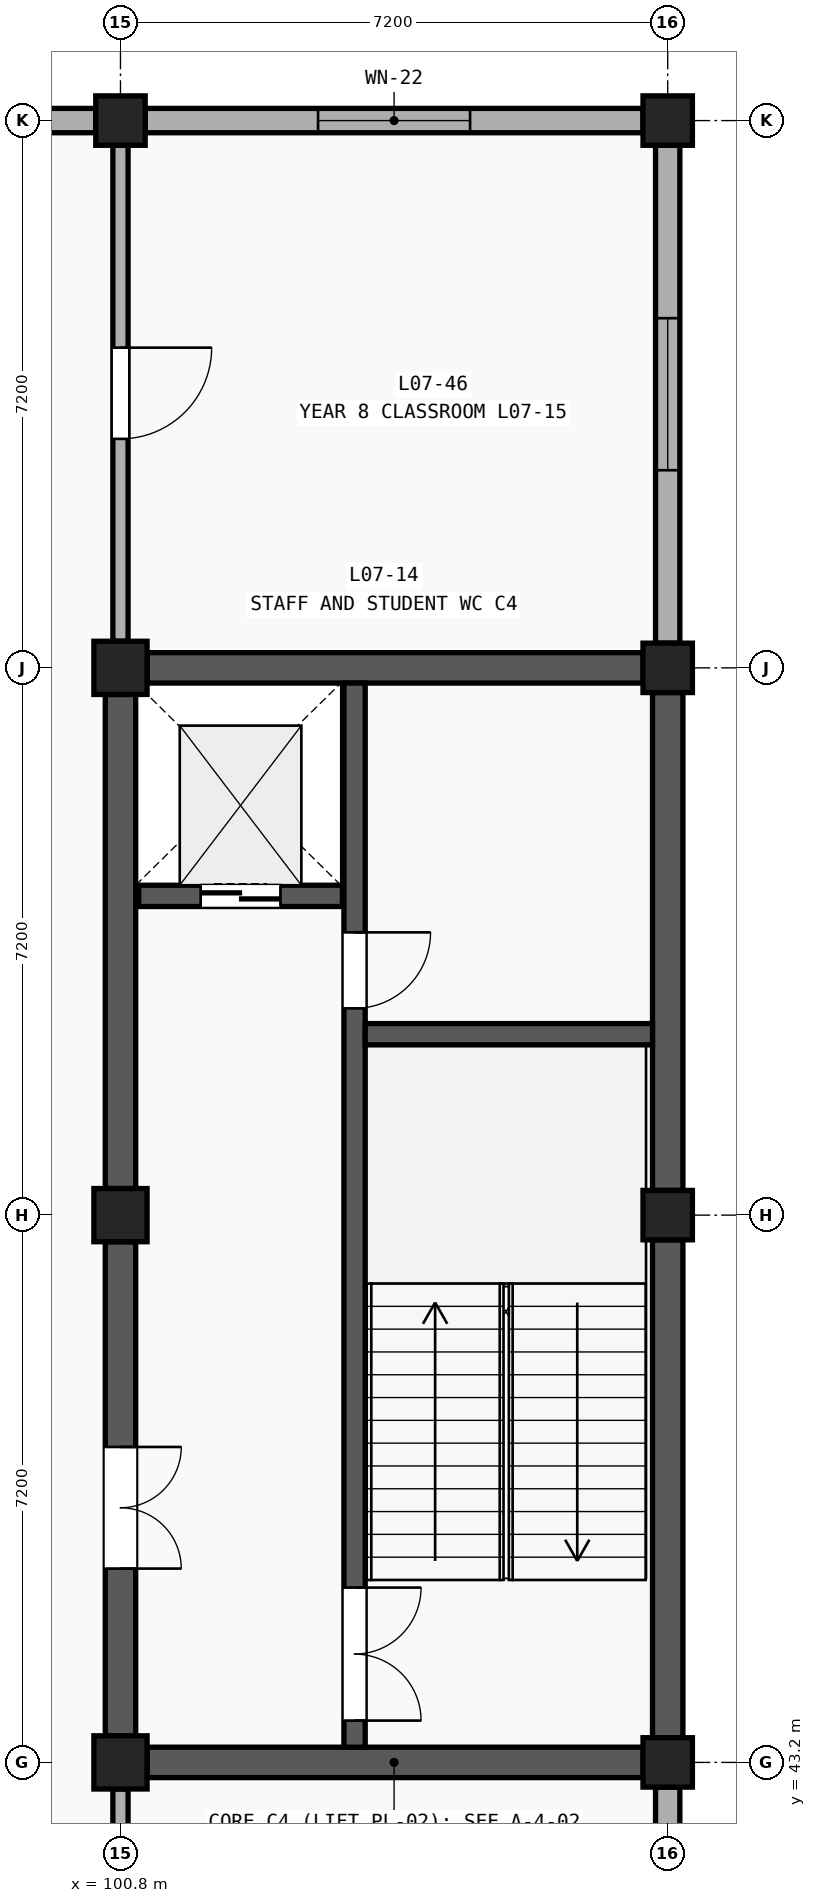
"""IFC4 building model, lengths in metres.
Left out: names, types, materials, properties, quantities, classifications, styles, units other than length and angle.
Written with IfcOpenShell. Run it as: python <this file> out.ifc"""

import sys

from ifc_helpers import new_model, si_unit, direction, frame, frame_2d, origin, origin_2d, place, context, subcontext, project, spatial, rectangle, extrude, element, fill, save


model = new_model("IFC4")
c1 = context("Model", 3, precision=1e-05, world=origin(), true_north=direction((0.0, 1.0)))
c2 = subcontext(c1, "Body", "Model", "MODEL_VIEW")
j1 = project(units=[si_unit("LENGTHUNIT", "METRE"), si_unit("PLANEANGLEUNIT", "RADIAN")], contexts=[c1])
p1 = place(None, origin())
s1 = spatial("IfcSite", under=j1, at=p1, CompositionType="ELEMENT")
p2 = place(p1, origin())
s2 = spatial("IfcBuilding", under=s1, at=p2, CompositionType="ELEMENT")
p3 = place(p2, frame((0.0, 0.0, 30.6)))
s3 = spatial("IfcBuildingStorey", under=s2, at=p3, CompositionType="ELEMENT", Elevation=30.6)
for number, where, z_axis, x_axis in (
    (1, (100.8, 43.2, 0.0), (0.0, 0.0, 1.0), (1.0, 0.0, 0.0)),
    (2, (100.8, 50.4, 0.0), (0.0, 0.0, 1.0), (1.0, 0.0, 0.0)),
    (3, (100.8, 57.6, 0.0), (0.0, 0.0, 1.0), (1.0, 0.0, 0.0)),
):
    element("IfcColumn", number, at=place(p3, frame(where, z_axis=z_axis, x_axis=x_axis)), inside=s3, PredefinedType="COLUMN", context=c2, shape_type="SweptSolid", body=[
        extrude(rectangle(XDim=0.7, YDim=0.7, at=origin_2d()), origin(), (0.0, 0.0, 1.0), 4.2),
    ])
for number, where, z_axis, x_axis in (
    (4, (100.8, 64.8, 0.0), (0.0, 0.0, 1.0), (1.0, 0.0, 0.0)),
    (5, (108.0, 43.2, 0.0), (0.0, 0.0, 1.0), (1.0, 0.0, 0.0)),
    (6, (108.0, 50.4, 0.0), (0.0, 0.0, 1.0), (1.0, 0.0, 0.0)),
    (7, (108.0, 57.6, 0.0), (0.0, 0.0, 1.0), (1.0, 0.0, 0.0)),
    (8, (108.0, 64.8, 0.0), (0.0, 0.0, 1.0), (1.0, 0.0, 0.0)),
):
    element("IfcColumn", number, at=place(p3, frame(where, z_axis=z_axis, x_axis=x_axis)), inside=s3, PredefinedType="COLUMN", context=c2, shape_type="SweptSolid", body=[
        extrude(rectangle(XDim=0.65, YDim=0.65, at=origin_2d()), origin(), (0.0, 0.0, 1.0), 4.2),
    ])
p4 = place(p3, frame((93.925, 64.8, 0.0), z_axis=(0.0, 0.0, 1.0), x_axis=(1.0, 0.0, 0.0)))
e9 = element("IfcWall", 9, at=p4, inside=s3, PredefinedType="SOLIDWALL", context=c2, shape_type="SweptSolid", body=[
    extrude(rectangle(XDim=6.55, YDim=0.32, at=frame_2d((3.275, 0.0))), origin(), (0.0, 0.0, 1.0), 3.25),
])
p5 = place(p4, frame((2.4, 0.0, 1.2)))
e10 = element("IfcOpeningElement", 10, at=p5, cuts=e9, PredefinedType="OPENING", context=c2, shape_type="SweptSolid", body=[
    extrude(rectangle(XDim=1.75, YDim=1.35, at=frame_2d((0.875, 0.675))), frame((0.0, 0.172, 0.0), z_axis=(0.0, -1.0, 0.0), x_axis=(1.0, 0.0, 0.0)), (0.0, 0.0, 1.0), 0.344),
])
p6 = place(p3, frame((108.0, 36.375, 0.0), z_axis=(0.0, 0.0, 1.0), x_axis=(0.0, 1.0, 0.0)))
e11 = element("IfcWall", 11, at=p6, inside=s3, PredefinedType="SOLIDWALL", context=c2, shape_type="SweptSolid", body=[
    extrude(rectangle(XDim=6.5, YDim=0.32, at=frame_2d((3.25, 0.0))), origin(), (0.0, 0.0, 1.0), 3.25),
])
p7 = place(p6, frame((2.0, 0.0, 1.1)))
e12 = element("IfcOpeningElement", 12, at=p7, cuts=e11, PredefinedType="OPENING", context=c2, shape_type="SweptSolid", body=[
    extrude(rectangle(XDim=2.5, YDim=1.5, at=frame_2d((1.25, 0.75))), frame((0.0, 0.172, 0.0), z_axis=(0.0, -1.0, 0.0), x_axis=(1.0, 0.0, 0.0)), (0.0, 0.0, 1.0), 0.344),
])
p8 = place(p3, frame((101.125, 64.8, 0.0), z_axis=(0.0, 0.0, 1.0), x_axis=(1.0, 0.0, 0.0)))
e13 = element("IfcWall", 13, at=p8, inside=s3, PredefinedType="SOLIDWALL", context=c2, shape_type="SweptSolid", body=[
    extrude(rectangle(XDim=6.55, YDim=0.32, at=frame_2d((3.275, 0.0))), origin(), (0.0, 0.0, 1.0), 3.25),
])
p9 = place(p8, frame((2.275, 0.0, 0.7)))
e14 = element("IfcOpeningElement", 14, at=p9, cuts=e13, PredefinedType="OPENING", context=c2, shape_type="SweptSolid", body=[
    extrude(rectangle(XDim=2.0, YDim=2.2, at=frame_2d((1.0, 1.1))), frame((0.0, 0.172, 0.0), z_axis=(0.0, -1.0, 0.0), x_axis=(1.0, 0.0, 0.0)), (0.0, 0.0, 1.0), 0.344),
])
p10 = place(p3, frame((108.0, 57.925, 0.0), z_axis=(0.0, 0.0, 1.0), x_axis=(0.0, 1.0, 0.0)))
e15 = element("IfcWall", 15, at=p10, inside=s3, PredefinedType="SOLIDWALL", context=c2, shape_type="SweptSolid", body=[
    extrude(rectangle(XDim=6.55, YDim=0.32, at=frame_2d((3.275, 0.0))), origin(), (0.0, 0.0, 1.0), 3.25),
])
p11 = place(p10, frame((2.275, 0.0, 0.7)))
e16 = element("IfcOpeningElement", 16, at=p11, cuts=e15, PredefinedType="OPENING", context=c2, shape_type="SweptSolid", body=[
    extrude(rectangle(XDim=2.0, YDim=2.2, at=frame_2d((1.0, 1.1))), frame((0.0, 0.172, 0.0), z_axis=(0.0, -1.0, 0.0), x_axis=(1.0, 0.0, 0.0)), (0.0, 0.0, 1.0), 0.344),
])
p12 = place(p3, frame((100.8, 43.55, 0.0), z_axis=(0.0, 0.0, 1.0), x_axis=(0.0, 1.0, 0.0)))
e17 = element("IfcWall", 17, at=p12, inside=s3, PredefinedType="SHEAR", context=c2, shape_type="SweptSolid", body=[
    extrude(rectangle(XDim=6.5, YDim=0.4, at=frame_2d((3.25, 0.0))), origin(), (0.0, 0.0, 1.0), 3.11),
])
p13 = place(p12, frame((2.2, 0.0, 0.0)))
e18 = element("IfcOpeningElement", 18, at=p13, cuts=e17, PredefinedType="OPENING", context=c2, shape_type="SweptSolid", body=[
    extrude(rectangle(XDim=1.6, YDim=2.2, at=frame_2d((0.8, 1.1))), frame((0.0, 0.212, 0.0), z_axis=(0.0, -1.0, 0.0), x_axis=(1.0, 0.0, 0.0)), (0.0, 0.0, 1.0), 0.424),
])
p14 = place(p3, frame((100.8, 50.75, 0.0), z_axis=(0.0, 0.0, 1.0), x_axis=(0.0, 1.0, 0.0)))
e19 = element("IfcWall", 19, at=p14, inside=s3, PredefinedType="SHEAR", context=c2, shape_type="SweptSolid", body=[
    extrude(rectangle(XDim=6.5, YDim=0.4, at=frame_2d((3.25, 0.0))), origin(), (0.0, 0.0, 1.0), 3.11),
])
p15 = place(p3, frame((108.0, 43.525, 0.0), z_axis=(0.0, 0.0, 1.0), x_axis=(0.0, 1.0, 0.0)))
e20 = element("IfcWall", 20, at=p15, inside=s3, PredefinedType="SHEAR", context=c2, shape_type="SweptSolid", body=[
    extrude(rectangle(XDim=6.55, YDim=0.4, at=frame_2d((3.275, 0.0))), origin(), (0.0, 0.0, 1.0), 3.25),
])
p16 = place(p3, frame((108.0, 50.725, 0.0), z_axis=(0.0, 0.0, 1.0), x_axis=(0.0, 1.0, 0.0)))
e21 = element("IfcWall", 21, at=p16, inside=s3, PredefinedType="SHEAR", context=c2, shape_type="SweptSolid", body=[
    extrude(rectangle(XDim=6.55, YDim=0.4, at=frame_2d((3.275, 0.0))), origin(), (0.0, 0.0, 1.0), 3.25),
])
p17 = place(p3, frame((101.15, 43.2, 0.0), z_axis=(0.0, 0.0, 1.0), x_axis=(1.0, 0.0, 0.0)))
e22 = element("IfcWall", 22, at=p17, inside=s3, PredefinedType="SHEAR", context=c2, shape_type="SweptSolid", body=[
    extrude(rectangle(XDim=6.525, YDim=0.4, at=frame_2d((3.263, 0.0))), origin(), (0.0, 0.0, 1.0), 3.18),
])
p18 = place(p3, frame((101.15, 57.6, 0.0), z_axis=(0.0, 0.0, 1.0), x_axis=(1.0, 0.0, 0.0)))
e23 = element("IfcWall", 23, at=p18, inside=s3, PredefinedType="SHEAR", context=c2, shape_type="SweptSolid", body=[
    extrude(rectangle(XDim=6.525, YDim=0.4, at=frame_2d((3.263, 0.0))), origin(), (0.0, 0.0, 1.0), 3.11),
])
p19 = place(p3, frame((103.88, 43.4, 0.0), z_axis=(0.0, 0.0, 1.0), x_axis=(0.0, 1.0, 0.0)))
e24 = element("IfcWall", 24, at=p19, inside=s3, PredefinedType="SHEAR", context=c2, shape_type="SweptSolid", body=[
    extrude(rectangle(XDim=14.0, YDim=0.28, at=frame_2d((7.0, 0.0))), origin(), (0.0, 0.0, 1.0), 3.88),
])
p20 = place(p19, frame((0.35, 0.0, 0.0)))
e25 = element("IfcOpeningElement", 25, at=p20, cuts=e24, PredefinedType="OPENING", context=c2, shape_type="SweptSolid", body=[
    extrude(rectangle(XDim=1.75, YDim=2.15, at=frame_2d((0.875, 1.075))), frame((0.0, 0.152, 0.0), z_axis=(0.0, -1.0, 0.0), x_axis=(1.0, 0.0, 0.0)), (0.0, 0.0, 1.0), 0.304),
])
p21 = place(p19, frame((9.72, 0.0, 0.0)))
e26 = element("IfcOpeningElement", 26, at=p21, cuts=e24, PredefinedType="OPENING", context=c2, shape_type="SweptSolid", body=[
    extrude(rectangle(XDim=1.0, YDim=2.15, at=frame_2d((0.5, 1.075))), frame((0.0, 0.152, 0.0), z_axis=(0.0, -1.0, 0.0), x_axis=(1.0, 0.0, 0.0)), (0.0, 0.0, 1.0), 0.304),
])
p22 = place(p3, frame((104.02, 52.78, 0.0), z_axis=(0.0, 0.0, 1.0), x_axis=(1.0, 0.0, 0.0)))
e27 = element("IfcWall", 27, at=p22, inside=s3, PredefinedType="SHEAR", context=c2, shape_type="SweptSolid", body=[
    extrude(rectangle(XDim=3.78, YDim=0.28, at=frame_2d((1.89, 0.0))), origin(), (0.0, 0.0, 1.0), 3.88),
])
p23 = place(p3, frame((101.04, 54.6, 0.0), z_axis=(0.0, 0.0, 1.0), x_axis=(1.0, 0.0, 0.0)))
e28 = element("IfcWall", 28, at=p23, inside=s3, PredefinedType="SHEAR", context=c2, shape_type="SweptSolid", body=[
    extrude(rectangle(XDim=2.68, YDim=0.28, at=frame_2d((1.34, 0.0))), origin(), (0.0, 0.0, 1.0), 3.88),
])
p24 = place(p23, frame((0.815, 0.0, 0.0)))
e29 = element("IfcOpeningElement", 29, at=p24, cuts=e28, PredefinedType="OPENING", context=c2, shape_type="SweptSolid", body=[
    extrude(rectangle(XDim=1.05, YDim=2.2, at=frame_2d((0.525, 1.1))), frame((0.0, 0.152, 0.0), z_axis=(0.0, -1.0, 0.0), x_axis=(1.0, 0.0, 0.0)), (0.0, 0.0, 1.0), 0.304),
])
p25 = place(p3, frame((100.8, 36.35, 0.0), z_axis=(0.0, 0.0, 1.0), x_axis=(0.0, 1.0, 0.0)))
e30 = element("IfcWall", 30, at=p25, inside=s3, PredefinedType="PARTITIONING", context=c2, shape_type="SweptSolid", body=[
    extrude(rectangle(XDim=6.5, YDim=0.2, at=frame_2d((3.25, 0.0))), origin(), (0.0, 0.0, 1.0), 3.11),
])
p26 = place(p25, frame((2.67, 0.0, 0.0)))
e31 = element("IfcOpeningElement", 31, at=p26, cuts=e30, PredefinedType="OPENING", context=c2, shape_type="SweptSolid", body=[
    extrude(rectangle(XDim=1.16, YDim=2.22, at=frame_2d((0.58, 1.11))), frame((0.0, 0.112, 0.0), z_axis=(0.0, -1.0, 0.0), x_axis=(1.0, 0.0, 0.0)), (0.0, 0.0, 1.0), 0.224),
])
p27 = place(p3, frame((100.8, 57.95, 0.0), z_axis=(0.0, 0.0, 1.0), x_axis=(0.0, 1.0, 0.0)))
e32 = element("IfcWall", 32, at=p27, inside=s3, PredefinedType="PARTITIONING", context=c2, shape_type="SweptSolid", body=[
    extrude(rectangle(XDim=6.525, YDim=0.2, at=frame_2d((3.263, 0.0))), origin(), (0.0, 0.0, 1.0), 3.11),
])
p28 = place(p27, frame((2.663, 0.0, 0.0)))
e33 = element("IfcOpeningElement", 33, at=p28, cuts=e32, PredefinedType="OPENING", context=c2, shape_type="SweptSolid", body=[
    extrude(rectangle(XDim=1.2, YDim=2.24, at=frame_2d((0.6, 1.12))), frame((0.0, 0.112, 0.0), z_axis=(0.0, -1.0, 0.0), x_axis=(1.0, 0.0, 0.0)), (0.0, 0.0, 1.0), 0.224),
])
p29 = place(p9, origin())
e34 = element("IfcWindow", 34, at=p29, inside=s3, PartitioningType="SINGLE_PANEL", PredefinedType="WINDOW", context=c2, shape_type="SweptSolid", body=[
    extrude(rectangle(XDim=2.0, YDim=2.2, at=frame_2d((1.0, 1.1))), frame((0.0, 0.03, 0.0), z_axis=(0.0, -1.0, 0.0), x_axis=(1.0, 0.0, 0.0)), (0.0, 0.0, 1.0), 0.06),
])
fill(e14, e34)
p30 = place(p11, origin())
e35 = element("IfcWindow", 35, at=p30, inside=s3, PartitioningType="SINGLE_PANEL", PredefinedType="WINDOW", context=c2, shape_type="SweptSolid", body=[
    extrude(rectangle(XDim=2.0, YDim=2.2, at=frame_2d((1.0, 1.1))), frame((0.0, 0.03, 0.0), z_axis=(0.0, -1.0, 0.0), x_axis=(1.0, 0.0, 0.0)), (0.0, 0.0, 1.0), 0.06),
])
fill(e16, e35)
p31 = place(p13, frame((1.6, 0.0, 0.0), z_axis=(0.0, 0.0, 1.0), x_axis=(-1.0, 0.0, 0.0)))
e36 = element("IfcDoor", 36, at=p31, inside=s3, OperationType="DOUBLE_DOOR_SINGLE_SWING", PredefinedType="DOOR", context=c2, shape_type="SweptSolid", body=[
    extrude(rectangle(XDim=1.6, YDim=2.2, at=frame_2d((0.8, 1.1))), frame((0.0, 0.025, 0.0), z_axis=(0.0, -1.0, 0.0), x_axis=(1.0, 0.0, 0.0)), (0.0, 0.0, 1.0), 0.05),
])
fill(e18, e36)
p32 = place(p20, frame((1.75, 0.0, 0.0), z_axis=(0.0, 0.0, 1.0), x_axis=(-1.0, 0.0, 0.0)))
e37 = element("IfcDoor", 37, at=p32, inside=s3, OperationType="DOUBLE_DOOR_SINGLE_SWING", PredefinedType="DOOR", context=c2, shape_type="SweptSolid", body=[
    extrude(rectangle(XDim=1.75, YDim=2.15, at=frame_2d((0.875, 1.075))), frame((0.0, 0.025, 0.0), z_axis=(0.0, -1.0, 0.0), x_axis=(1.0, 0.0, 0.0)), (0.0, 0.0, 1.0), 0.05),
])
fill(e25, e37)
p33 = place(p21, frame((1.0, 0.0, 0.0), z_axis=(0.0, 0.0, 1.0), x_axis=(-1.0, 0.0, 0.0)))
e38 = element("IfcDoor", 38, at=p33, inside=s3, OperationType="SINGLE_SWING_LEFT", PredefinedType="DOOR", context=c2, shape_type="SweptSolid", body=[
    extrude(rectangle(XDim=1.0, YDim=2.15, at=frame_2d((0.5, 1.075))), frame((0.0, 0.025, 0.0), z_axis=(0.0, -1.0, 0.0), x_axis=(1.0, 0.0, 0.0)), (0.0, 0.0, 1.0), 0.05),
])
fill(e26, e38)
p34 = place(p24, frame((1.05, 0.0, 0.0), z_axis=(0.0, 0.0, 1.0), x_axis=(-1.0, 0.0, 0.0)))
e39 = element("IfcDoor", 39, at=p34, inside=s3, OperationType="DOUBLE_DOOR_SLIDING", PredefinedType="DOOR", context=c2, shape_type="SweptSolid", body=[
    extrude(rectangle(XDim=1.05, YDim=2.2, at=frame_2d((0.525, 1.1))), frame((0.0, 0.025, 0.0), z_axis=(0.0, -1.0, 0.0), x_axis=(1.0, 0.0, 0.0)), (0.0, 0.0, 1.0), 0.05),
])
fill(e29, e39)
p35 = place(p28, frame((1.2, 0.0, 0.0), z_axis=(0.0, 0.0, 1.0), x_axis=(-1.0, 0.0, 0.0)))
e40 = element("IfcDoor", 40, at=p35, inside=s3, OperationType="SINGLE_SWING_LEFT", PredefinedType="DOOR", context=c2, shape_type="SweptSolid", body=[
    extrude(rectangle(XDim=1.2, YDim=2.24, at=frame_2d((0.6, 1.12))), frame((0.0, 0.025, 0.0), z_axis=(0.0, -1.0, 0.0), x_axis=(1.0, 0.0, 0.0)), (0.0, 0.0, 1.0), 0.05),
])
fill(e33, e40)
save(model, sys.argv[1])
